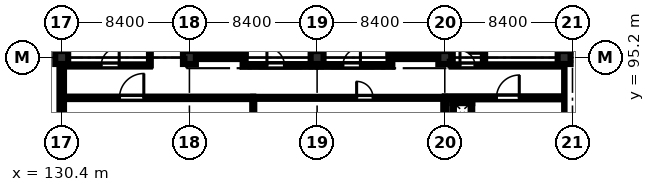
"""IFC4 building model, lengths in metres.
Left out: names, types, materials, properties, quantities, classifications, styles, units other than length and angle.
Written with IfcOpenShell. Run it as: python <this file> out.ifc"""

import sys

from ifc_helpers import new_model, si_unit, direction, frame, frame_2d, origin, origin_2d, place, context, subcontext, project, spatial, rectangle, extrude, element, fill, save


model = new_model("IFC4")
c1 = context("Model", 3, precision=1e-05, world=origin(), true_north=direction((0.0, 1.0)))
c2 = subcontext(c1, "Body", "Model", "MODEL_VIEW")
j1 = project(units=[si_unit("LENGTHUNIT", "METRE"), si_unit("PLANEANGLEUNIT", "RADIAN")], contexts=[c1])
p1 = place(None, origin())
s1 = spatial("IfcSite", under=j1, at=p1, CompositionType="ELEMENT")
p2 = place(p1, origin())
s2 = spatial("IfcBuilding", under=s1, at=p2, CompositionType="ELEMENT")
p3 = place(p2, frame((0.0, 0.0, 31.8)))
s3 = spatial("IfcBuildingStorey", under=s2, at=p3, CompositionType="ELEMENT", Elevation=31.8)
for number, where, z_axis, x_axis in (
    (1, (130.4, 95.2, 0.0), (0.0, 0.0, 1.0), (1.0, 0.0, 0.0)),
    (2, (138.8, 95.2, 0.0), (0.0, 0.0, 1.0), (1.0, 0.0, 0.0)),
    (3, (147.2, 95.2, 0.0), (0.0, 0.0, 1.0), (1.0, 0.0, 0.0)),
    (4, (155.6, 95.2, 0.0), (0.0, 0.0, 1.0), (1.0, 0.0, 0.0)),
    (5, (163.45, 95.2, 0.0), (0.0, 0.0, 1.0), (1.0, 0.0, 0.0)),
):
    element("IfcColumn", number, at=place(p3, frame(where, z_axis=z_axis, x_axis=x_axis)), inside=s3, PredefinedType="COLUMN", context=c2, shape_type="SweptSolid", body=[
        extrude(rectangle(XDim=0.85, YDim=0.85, at=origin_2d()), origin(), (0.0, 0.0, 1.0), 4.02),
    ])
p4 = place(p3, frame((138.7, 95.275, 0.0), z_axis=(0.0, 0.0, 1.0), x_axis=(1.0, 0.0, 0.0)))
e6 = element("IfcWall", 6, at=p4, inside=s3, PredefinedType="SHEAR", context=c2, shape_type="SweptSolid", body=[
    extrude(rectangle(XDim=3.8, YDim=0.35, at=frame_2d((1.9, 0.0))), origin(), (0.0, 0.0, 1.0), 4.02),
])
p5 = place(p3, frame((138.875, 95.45, 0.0), z_axis=(0.0, 0.0, 1.0), x_axis=(0.0, 1.0, 0.0)))
e7 = element("IfcWall", 7, at=p5, inside=s3, PredefinedType="SHEAR", context=c2, shape_type="SweptSolid", body=[
    extrude(rectangle(XDim=7.9, YDim=0.35, at=frame_2d((3.95, 0.0))), origin(), (0.0, 0.0, 1.0), 4.02),
])
p6 = place(p3, frame((142.325, 95.45, 0.0), z_axis=(0.0, 0.0, 1.0), x_axis=(0.0, 1.0, 0.0)))
e8 = element("IfcWall", 8, at=p6, inside=s3, PredefinedType="SHEAR", context=c2, shape_type="SweptSolid", body=[
    extrude(rectangle(XDim=7.9, YDim=0.35, at=frame_2d((3.95, 0.0))), origin(), (0.0, 0.0, 1.0), 4.02),
])
p7 = place(p6, frame((0.22, 0.0, 0.0)))
e9 = element("IfcOpeningElement", 9, at=p7, cuts=e8, PredefinedType="OPENING", context=c2, shape_type="SweptSolid", body=[
    extrude(rectangle(XDim=1.15, YDim=2.15, at=frame_2d((0.575, 1.075))), frame((0.0, 0.185, 0.0), z_axis=(0.0, -1.0, 0.0), x_axis=(1.0, 0.0, 0.0)), (0.0, 0.0, 1.0), 0.37),
])
p8 = place(p3, frame((151.9, 95.275, 0.0), z_axis=(0.0, 0.0, 1.0), x_axis=(1.0, 0.0, 0.0)))
e10 = element("IfcWall", 10, at=p8, inside=s3, PredefinedType="SHEAR", context=c2, shape_type="SweptSolid", body=[
    extrude(rectangle(XDim=3.8, YDim=0.35, at=frame_2d((1.9, 0.0))), origin(), (0.0, 0.0, 1.0), 4.02),
])
p9 = place(p3, frame((152.075, 95.45, 0.0), z_axis=(0.0, 0.0, 1.0), x_axis=(0.0, 1.0, 0.0)))
e11 = element("IfcWall", 11, at=p9, inside=s3, PredefinedType="SHEAR", context=c2, shape_type="SweptSolid", body=[
    extrude(rectangle(XDim=7.9, YDim=0.35, at=frame_2d((3.95, 0.0))), origin(), (0.0, 0.0, 1.0), 4.02),
])
p10 = place(p9, frame((0.35, 0.0, 0.0)))
e12 = element("IfcOpeningElement", 12, at=p10, cuts=e11, PredefinedType="OPENING", context=c2, shape_type="SweptSolid", body=[
    extrude(rectangle(XDim=1.15, YDim=2.15, at=frame_2d((0.575, 1.075))), frame((0.0, 0.185, 0.0), z_axis=(0.0, -1.0, 0.0), x_axis=(1.0, 0.0, 0.0)), (0.0, 0.0, 1.0), 0.37),
])
p11 = place(p3, frame((155.525, 95.45, 0.0), z_axis=(0.0, 0.0, 1.0), x_axis=(0.0, 1.0, 0.0)))
e13 = element("IfcWall", 13, at=p11, inside=s3, PredefinedType="SHEAR", context=c2, shape_type="SweptSolid", body=[
    extrude(rectangle(XDim=7.9, YDim=0.35, at=frame_2d((3.95, 0.0))), origin(), (0.0, 0.0, 1.0), 4.02),
])
p12 = place(p3, frame((130.4, 87.225, 0.0), z_axis=(0.0, 0.0, 1.0), x_axis=(0.0, 1.0, 0.0)))
e14 = element("IfcWall", 14, at=p12, inside=s3, PredefinedType="STANDARD", context=c2, shape_type="SweptSolid", body=[
    extrude(rectangle(XDim=7.55, YDim=0.3, at=frame_2d((3.775, 0.0))), origin(), (0.0, 0.0, 1.0), 3.32),
])
p13 = place(p12, frame((2.4, 0.0, 0.95)))
e15 = element("IfcOpeningElement", 15, at=p13, cuts=e14, PredefinedType="OPENING", context=c2, shape_type="SweptSolid", body=[
    extrude(rectangle(XDim=1.5, YDim=1.8, at=frame_2d((0.75, 0.9))), frame((0.0, 0.16, 0.0), z_axis=(0.0, -1.0, 0.0), x_axis=(1.0, 0.0, 0.0)), (0.0, 0.0, 1.0), 0.32),
])
p14 = place(p3, frame((142.3, 94.68, 0.0), z_axis=(0.0, 0.0, 1.0), x_axis=(1.0, 0.0, 0.0)))
e16 = element("IfcWall", 16, at=p14, inside=s3, PredefinedType="STANDARD", context=c2, shape_type="SweptSolid", body=[
    extrude(rectangle(XDim=4.8, YDim=0.18, at=frame_2d((2.4, 0.0))), origin(), (0.0, 0.0, 1.0), 4.02),
])
p15 = place(p14, frame((1.6, 0.0, 0.0)))
e17 = element("IfcOpeningElement", 17, at=p15, cuts=e16, PredefinedType="OPENING", context=c2, shape_type="SweptSolid", body=[
    extrude(rectangle(XDim=1.15, YDim=2.15, at=frame_2d((0.575, 1.075))), frame((0.0, 0.1, 0.0), z_axis=(0.0, -1.0, 0.0), x_axis=(1.0, 0.0, 0.0)), (0.0, 0.0, 1.0), 0.2),
])
p16 = place(p3, frame((147.3, 94.68, 0.0), z_axis=(0.0, 0.0, 1.0), x_axis=(1.0, 0.0, 0.0)))
e18 = element("IfcWall", 18, at=p16, inside=s3, PredefinedType="STANDARD", context=c2, shape_type="SweptSolid", body=[
    extrude(rectangle(XDim=4.85, YDim=0.18, at=frame_2d((2.425, 0.0))), origin(), (0.0, 0.0, 1.0), 4.02),
])
p17 = place(p16, frame((1.6, 0.0, 0.0)))
e19 = element("IfcOpeningElement", 19, at=p17, cuts=e18, PredefinedType="OPENING", context=c2, shape_type="SweptSolid", body=[
    extrude(rectangle(XDim=1.15, YDim=2.15, at=frame_2d((0.575, 1.075))), frame((0.0, 0.1, 0.0), z_axis=(0.0, -1.0, 0.0), x_axis=(1.0, 0.0, 0.0)), (0.0, 0.0, 1.0), 0.2),
])
p18 = place(p3, frame((156.05, 94.68, 0.0), z_axis=(0.0, 0.0, 1.0), x_axis=(1.0, 0.0, 0.0)))
e20 = element("IfcWall", 20, at=p18, inside=s3, PredefinedType="PARTITIONING", context=c2, shape_type="SweptSolid", body=[
    extrude(rectangle(XDim=7.15, YDim=0.15, at=frame_2d((3.575, 0.0))), origin(), (0.0, 0.0, 1.0), 4.02),
])
p19 = place(p18, frame((0.55, 0.0, 0.0)))
e21 = element("IfcOpeningElement", 21, at=p19, cuts=e20, PredefinedType="OPENING", context=c2, shape_type="SweptSolid", body=[
    extrude(rectangle(XDim=0.98, YDim=2.12, at=frame_2d((0.49, 1.06))), frame((0.0, 0.085, 0.0), z_axis=(0.0, -1.0, 0.0), x_axis=(1.0, 0.0, 0.0)), (0.0, 0.0, 1.0), 0.17),
])
p20 = place(p3, frame((158.18, 94.68, 0.0), z_axis=(0.0, 0.0, 1.0), x_axis=(0.0, 1.0, 0.0)))
e22 = element("IfcWall", 22, at=p20, inside=s3, PredefinedType="PARTITIONING", context=c2, shape_type="SweptSolid", body=[
    extrude(rectangle(XDim=8.57, YDim=0.15, at=frame_2d((4.285, 0.0))), origin(), (0.0, 0.0, 1.0), 4.02),
])
p21 = place(p20, frame((0.8, 0.0, 0.0)))
e23 = element("IfcOpeningElement", 23, at=p21, cuts=e22, PredefinedType="OPENING", context=c2, shape_type="SweptSolid", body=[
    extrude(rectangle(XDim=1.0, YDim=2.12, at=frame_2d((0.5, 1.06))), frame((0.0, 0.085, 0.0), z_axis=(0.0, -1.0, 0.0), x_axis=(1.0, 0.0, 0.0)), (0.0, 0.0, 1.0), 0.17),
])
p22 = place(p20, frame((3.5, 0.0, 0.0)))
e24 = element("IfcOpeningElement", 24, at=p22, cuts=e22, PredefinedType="OPENING", context=c2, shape_type="SweptSolid", body=[
    extrude(rectangle(XDim=0.92, YDim=2.1, at=frame_2d((0.46, 1.05))), frame((0.0, 0.085, 0.0), z_axis=(0.0, -1.0, 0.0), x_axis=(1.0, 0.0, 0.0)), (0.0, 0.0, 1.0), 0.17),
])
p23 = place(p20, frame((6.4, 0.0, 0.0)))
e25 = element("IfcOpeningElement", 25, at=p23, cuts=e22, PredefinedType="OPENING", context=c2, shape_type="SweptSolid", body=[
    extrude(rectangle(XDim=0.92, YDim=2.1, at=frame_2d((0.46, 1.05))), frame((0.0, 0.085, 0.0), z_axis=(0.0, -1.0, 0.0), x_axis=(1.0, 0.0, 0.0)), (0.0, 0.0, 1.0), 0.17),
])
p24 = place(p3, frame((156.05, 94.68, 0.0), z_axis=(0.0, 0.0, 1.0), x_axis=(0.0, 1.0, 0.0)))
e26 = element("IfcWall", 26, at=p24, inside=s3, PredefinedType="PARTITIONING", context=c2, shape_type="SweptSolid", body=[
    extrude(rectangle(XDim=8.57, YDim=0.15, at=frame_2d((4.285, 0.0))), origin(), (0.0, 0.0, 1.0), 4.02),
])
p25 = place(p3, frame((136.2, 94.68, 0.0), z_axis=(0.0, 0.0, 1.0), x_axis=(0.0, 1.0, 0.0)))
e27 = element("IfcWall", 27, at=p25, inside=s3, PredefinedType="PARTITIONING", context=c2, shape_type="SweptSolid", body=[
    extrude(rectangle(XDim=9.07, YDim=0.12, at=frame_2d((4.535, 0.0))), origin(), (0.0, 0.0, 1.0), 4.02),
])
p26 = place(p3, frame((130.8, 94.68, 0.0), z_axis=(0.0, 0.0, 1.0), x_axis=(1.0, 0.0, 0.0)))
e28 = element("IfcWall", 28, at=p26, inside=s3, PredefinedType="PARTITIONING", context=c2, shape_type="SweptSolid", body=[
    extrude(rectangle(XDim=5.4, YDim=0.145, at=frame_2d((2.7, 0.0))), origin(), (0.0, 0.0, 1.0), 4.02),
])
p27 = place(p26, frame((2.2, 0.0, 0.0)))
e29 = element("IfcOpeningElement", 29, at=p27, cuts=e28, PredefinedType="OPENING", context=c2, shape_type="SweptSolid", body=[
    extrude(rectangle(XDim=1.18, YDim=2.18, at=frame_2d((0.59, 1.09))), frame((0.0, 0.083, 0.0), z_axis=(0.0, -1.0, 0.0), x_axis=(1.0, 0.0, 0.0)), (0.0, 0.0, 1.0), 0.165),
])
p28 = place(p3, frame((130.55, 92.55, 0.0), z_axis=(0.0, 0.0, 1.0), x_axis=(1.0, 0.0, 0.0)))
e30 = element("IfcWall", 30, at=p28, inside=s3, PredefinedType="PARTITIONING", context=c2, shape_type="SweptSolid", body=[
    extrude(rectangle(XDim=12.45, YDim=0.165, at=frame_2d((6.225, 0.0))), origin(), (0.0, 0.0, 1.0), 4.02),
])
p29 = place(p28, frame((3.65, 0.0, 0.0)))
e31 = element("IfcOpeningElement", 31, at=p29, cuts=e30, PredefinedType="OPENING", context=c2, shape_type="SweptSolid", body=[
    extrude(rectangle(XDim=1.6, YDim=2.24, at=frame_2d((0.8, 1.12))), frame((0.0, 0.093, 0.0), z_axis=(0.0, -1.0, 0.0), x_axis=(1.0, 0.0, 0.0)), (0.0, 0.0, 1.0), 0.185),
])
p30 = place(p3, frame((143.0, 92.55, 0.0), z_axis=(0.0, 0.0, 1.0), x_axis=(1.0, 0.0, 0.0)))
e32 = element("IfcWall", 32, at=p30, inside=s3, PredefinedType="PARTITIONING", context=c2, shape_type="SweptSolid", body=[
    extrude(rectangle(XDim=12.6, YDim=0.135, at=frame_2d((6.3, 0.0))), origin(), (0.0, 0.0, 1.0), 4.02),
])
p31 = place(p30, frame((6.8, 0.0, 0.0)))
e33 = element("IfcOpeningElement", 33, at=p31, cuts=e32, PredefinedType="OPENING", context=c2, shape_type="SweptSolid", body=[
    extrude(rectangle(XDim=1.08, YDim=2.15, at=frame_2d((0.54, 1.075))), frame((0.0, 0.077, 0.0), z_axis=(0.0, -1.0, 0.0), x_axis=(1.0, 0.0, 0.0)), (0.0, 0.0, 1.0), 0.155),
])
p32 = place(p3, frame((143.0, 78.55, 0.0), z_axis=(0.0, 0.0, 1.0), x_axis=(0.0, 1.0, 0.0)))
e34 = element("IfcWall", 34, at=p32, inside=s3, PredefinedType="PARTITIONING", context=c2, shape_type="SweptSolid", body=[
    extrude(rectangle(XDim=14.0, YDim=0.135, at=frame_2d((7.0, 0.0))), origin(), (0.0, 0.0, 1.0), 3.52),
])
p33 = place(p3, frame((155.6, 92.55, 0.0), z_axis=(0.0, 0.0, 1.0), x_axis=(1.0, 0.0, 0.0)))
e35 = element("IfcWall", 35, at=p33, inside=s3, PredefinedType="SOLIDWALL", context=c2, shape_type="SweptSolid", body=[
    extrude(rectangle(XDim=7.75, YDim=0.2, at=frame_2d((3.875, 0.0))), origin(), (0.0, 0.0, 1.0), 4.02),
])
p34 = place(p33, frame((3.4, 0.0, 0.0)))
e36 = element("IfcOpeningElement", 36, at=p34, cuts=e35, PredefinedType="OPENING", context=c2, shape_type="SweptSolid", body=[
    extrude(rectangle(XDim=1.5, YDim=2.2, at=frame_2d((0.75, 1.1))), frame((0.0, 0.11, 0.0), z_axis=(0.0, -1.0, 0.0), x_axis=(1.0, 0.0, 0.0)), (0.0, 0.0, 1.0), 0.22),
])
p35 = place(p3, frame((155.6, 78.55, 0.0), z_axis=(0.0, 0.0, 1.0), x_axis=(0.0, 1.0, 0.0)))
e37 = element("IfcWall", 37, at=p35, inside=s3, PredefinedType="SOLIDWALL", context=c2, shape_type="SweptSolid", body=[
    extrude(rectangle(XDim=14.0, YDim=0.2, at=frame_2d((7.0, 0.0))), origin(), (0.0, 0.0, 1.0), 3.32),
])
p36 = place(p3, frame((156.095, 92.252, 0.0), z_axis=(0.0, 0.0, 1.0), x_axis=(1.0, 0.0, 0.0)))
e38 = element("IfcWall", 38, at=p36, inside=s3, PredefinedType="PARTITIONING", context=c2, shape_type="SweptSolid", body=[
    extrude(rectangle(XDim=1.31, YDim=0.105, at=frame_2d((0.655, 0.0))), origin(), (0.0, 0.0, 1.0), 4.02),
])
for number, where, z_axis, x_axis in (
    (39, (156.147, 91.2, 0.0), (0.0, 0.0, 1.0), (0.0, 1.0, 0.0)),
    (40, (157.353, 91.2, 0.0), (0.0, 0.0, 1.0), (0.0, 1.0, 0.0)),
):
    element("IfcWall", number, at=place(p3, frame(where, z_axis=z_axis, x_axis=x_axis)), inside=s3, PredefinedType="PARTITIONING", context=c2, shape_type="SweptSolid", body=[
        extrude(rectangle(XDim=1.0, YDim=0.105, at=frame_2d((0.5, 0.0))), origin(), (0.0, 0.0, 1.0), 4.02),
    ])
p37 = place(p15, origin())
e41 = element("IfcDoor", 41, at=p37, inside=s3, OperationType="SINGLE_SWING_LEFT", PredefinedType="DOOR", context=c2, shape_type="SweptSolid", body=[
    extrude(rectangle(XDim=1.15, YDim=2.15, at=frame_2d((0.575, 1.075))), frame((0.0, 0.025, 0.0), z_axis=(0.0, -1.0, 0.0), x_axis=(1.0, 0.0, 0.0)), (0.0, 0.0, 1.0), 0.05),
])
fill(e17, e41)
p38 = place(p17, origin())
e42 = element("IfcDoor", 42, at=p38, inside=s3, OperationType="SINGLE_SWING_RIGHT", PredefinedType="DOOR", context=c2, shape_type="SweptSolid", body=[
    extrude(rectangle(XDim=1.15, YDim=2.15, at=frame_2d((0.575, 1.075))), frame((0.0, 0.025, 0.0), z_axis=(0.0, -1.0, 0.0), x_axis=(1.0, 0.0, 0.0)), (0.0, 0.0, 1.0), 0.05),
])
fill(e19, e42)
p39 = place(p19, origin())
e43 = element("IfcDoor", 43, at=p39, inside=s3, OperationType="SINGLE_SWING_LEFT", PredefinedType="DOOR", context=c2, shape_type="SweptSolid", body=[
    extrude(rectangle(XDim=0.98, YDim=2.12, at=frame_2d((0.49, 1.06))), frame((0.0, 0.025, 0.0), z_axis=(0.0, -1.0, 0.0), x_axis=(1.0, 0.0, 0.0)), (0.0, 0.0, 1.0), 0.05),
])
fill(e21, e43)
p40 = place(p21, origin())
e44 = element("IfcDoor", 44, at=p40, inside=s3, OperationType="SINGLE_SWING_LEFT", PredefinedType="DOOR", context=c2, shape_type="SweptSolid", body=[
    extrude(rectangle(XDim=1.0, YDim=2.12, at=frame_2d((0.5, 1.06))), frame((0.0, 0.025, 0.0), z_axis=(0.0, -1.0, 0.0), x_axis=(1.0, 0.0, 0.0)), (0.0, 0.0, 1.0), 0.05),
])
fill(e23, e44)
p41 = place(p27, origin())
e45 = element("IfcDoor", 45, at=p41, inside=s3, OperationType="SINGLE_SWING_RIGHT", PredefinedType="DOOR", context=c2, shape_type="SweptSolid", body=[
    extrude(rectangle(XDim=1.18, YDim=2.18, at=frame_2d((0.59, 1.09))), frame((0.0, 0.025, 0.0), z_axis=(0.0, -1.0, 0.0), x_axis=(1.0, 0.0, 0.0)), (0.0, 0.0, 1.0), 0.05),
])
fill(e29, e45)
p42 = place(p29, origin())
e46 = element("IfcDoor", 46, at=p42, inside=s3, OperationType="SINGLE_SWING_RIGHT", PredefinedType="DOOR", context=c2, shape_type="SweptSolid", body=[
    extrude(rectangle(XDim=1.6, YDim=2.24, at=frame_2d((0.8, 1.12))), frame((0.0, 0.025, 0.0), z_axis=(0.0, -1.0, 0.0), x_axis=(1.0, 0.0, 0.0)), (0.0, 0.0, 1.0), 0.05),
])
fill(e31, e46)
p43 = place(p31, origin())
e47 = element("IfcDoor", 47, at=p43, inside=s3, OperationType="SINGLE_SWING_LEFT", PredefinedType="DOOR", context=c2, shape_type="SweptSolid", body=[
    extrude(rectangle(XDim=1.08, YDim=2.15, at=frame_2d((0.54, 1.075))), frame((0.0, 0.025, 0.0), z_axis=(0.0, -1.0, 0.0), x_axis=(1.0, 0.0, 0.0)), (0.0, 0.0, 1.0), 0.05),
])
fill(e33, e47)
p44 = place(p34, origin())
e48 = element("IfcDoor", 48, at=p44, inside=s3, OperationType="SINGLE_SWING_RIGHT", PredefinedType="DOOR", context=c2, shape_type="SweptSolid", body=[
    extrude(rectangle(XDim=1.5, YDim=2.2, at=frame_2d((0.75, 1.1))), frame((0.0, 0.025, 0.0), z_axis=(0.0, -1.0, 0.0), x_axis=(1.0, 0.0, 0.0)), (0.0, 0.0, 1.0), 0.05),
])
fill(e36, e48)
save(model, sys.argv[1])
